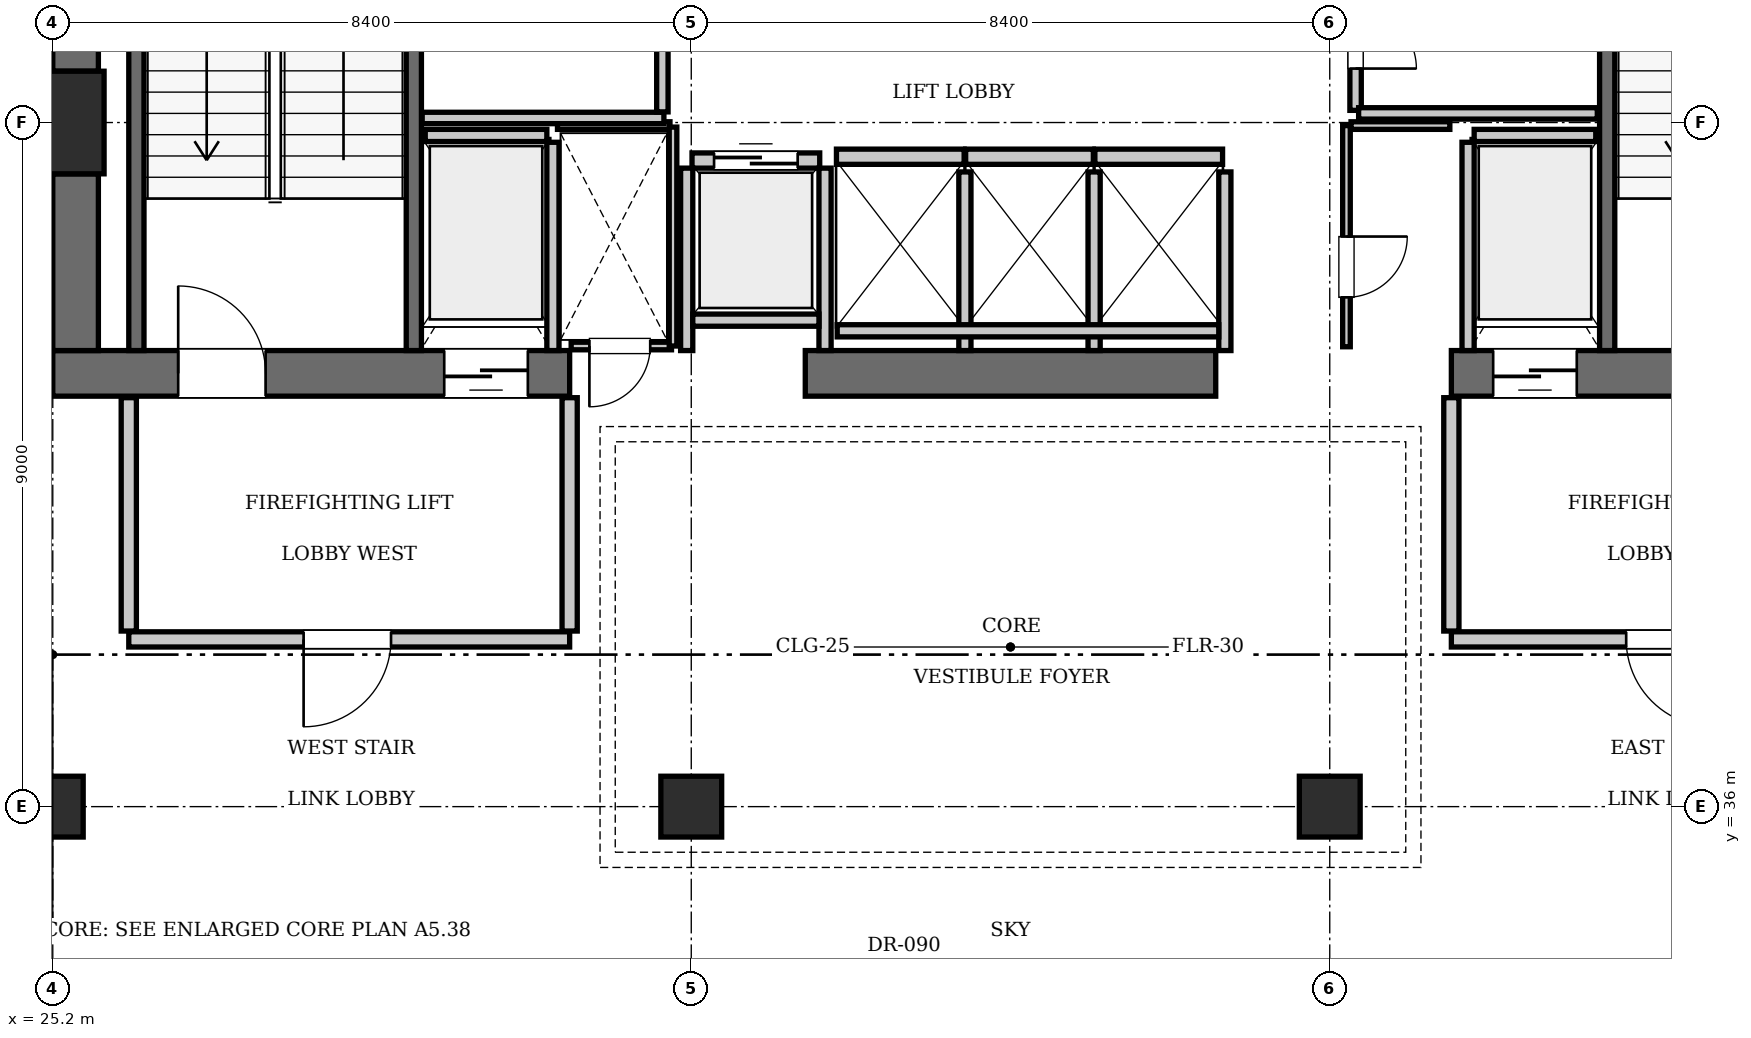
"""IFC4 building model, lengths in metres.
Left out: names, types, materials, properties, quantities, classifications, styles, units other than length and angle.
Written with IfcOpenShell. Run it as: python <this file> out.ifc"""

import sys

from ifc_helpers import new_model, si_unit, direction, frame, frame_2d, origin, origin_2d, place, context, subcontext, project, spatial, rectangle, extrude, element, fill, save


model = new_model("IFC4")
c1 = context("Model", 3, precision=1e-05, world=origin(), true_north=direction((0.0, 1.0)))
c2 = subcontext(c1, "Body", "Model", "MODEL_VIEW")
j1 = project(units=[si_unit("LENGTHUNIT", "METRE"), si_unit("PLANEANGLEUNIT", "RADIAN")], contexts=[c1])
p1 = place(None, origin())
s1 = spatial("IfcSite", under=j1, at=p1, CompositionType="ELEMENT")
p2 = place(p1, origin())
s2 = spatial("IfcBuilding", under=s1, at=p2, CompositionType="ELEMENT")
p3 = place(p2, frame((0.0, 0.0, 345.1)))
s3 = spatial("IfcBuildingStorey", under=s2, at=p3, CompositionType="ELEMENT", Elevation=345.1)
p4 = place(p3, frame((25.2, 45.0, 0.0), z_axis=(0.0, 0.0, 1.0), x_axis=(1.0, 0.0, 0.0)))
e1 = element("IfcColumn", 1, at=p4, inside=s3, PredefinedType="COLUMN", context=c2, shape_type="SweptSolid", body=[
    extrude(rectangle(XDim=1.35, YDim=1.35, at=origin_2d()), origin(), (0.0, 0.0, 1.0), 4.55),
])
p5 = place(p3, frame((25.2, 41.7, 0.0), z_axis=(0.0, 0.0, 1.0), x_axis=(1.0, 0.0, 0.0)))
e2 = element("IfcWall", 2, at=p5, inside=s3, PredefinedType="SHEAR", context=c2, shape_type="SweptSolid", body=[
    extrude(rectangle(XDim=6.8, YDim=0.6, at=frame_2d((3.4, 0.0))), origin(), (0.0, 0.0, 1.0), 4.55),
])
p6 = place(p5, frame((1.65, 0.0, 0.0)))
e3 = element("IfcOpeningElement", 3, at=p6, cuts=e2, PredefinedType="OPENING", context=c2, shape_type="SweptSolid", body=[
    extrude(rectangle(XDim=1.15, YDim=2.15, at=frame_2d((0.575, 1.075))), frame((0.0, 0.31, 0.0), z_axis=(0.0, -1.0, 0.0), x_axis=(1.0, 0.0, 0.0)), (0.0, 0.0, 1.0), 0.62),
])
p7 = place(p5, frame((5.15, 0.0, 0.0)))
e4 = element("IfcOpeningElement", 4, at=p7, cuts=e2, PredefinedType="OPENING", context=c2, shape_type="SweptSolid", body=[
    extrude(rectangle(XDim=1.1, YDim=2.2, at=frame_2d((0.55, 1.1))), frame((0.0, 0.31, 0.0), z_axis=(0.0, -1.0, 0.0), x_axis=(1.0, 0.0, 0.0)), (0.0, 0.0, 1.0), 0.62),
])
p8 = place(p3, frame((35.1, 41.7, 0.0), z_axis=(0.0, 0.0, 1.0), x_axis=(1.0, 0.0, 0.0)))
e5 = element("IfcWall", 5, at=p8, inside=s3, PredefinedType="SHEAR", context=c2, shape_type="SweptSolid", body=[
    extrude(rectangle(XDim=5.4, YDim=0.6, at=frame_2d((2.7, 0.0))), origin(), (0.0, 0.0, 1.0), 4.55),
])
p9 = place(p3, frame((43.6, 41.7, 0.0), z_axis=(0.0, 0.0, 1.0), x_axis=(1.0, 0.0, 0.0)))
e6 = element("IfcWall", 6, at=p9, inside=s3, PredefinedType="SHEAR", context=c2, shape_type="SweptSolid", body=[
    extrude(rectangle(XDim=6.8, YDim=0.6, at=frame_2d((3.4, 0.0))), origin(), (0.0, 0.0, 1.0), 4.55),
])
p10 = place(p9, frame((3.9, 0.0, 0.0)))
e7 = element("IfcOpeningElement", 7, at=p10, cuts=e6, PredefinedType="OPENING", context=c2, shape_type="SweptSolid", body=[
    extrude(rectangle(XDim=1.15, YDim=2.15, at=frame_2d((0.575, 1.075))), frame((0.0, 0.31, 0.0), z_axis=(0.0, -1.0, 0.0), x_axis=(1.0, 0.0, 0.0)), (0.0, 0.0, 1.0), 0.62),
])
p11 = place(p9, frame((0.55, 0.0, 0.0)))
e8 = element("IfcOpeningElement", 8, at=p11, cuts=e6, PredefinedType="OPENING", context=c2, shape_type="SweptSolid", body=[
    extrude(rectangle(XDim=1.1, YDim=2.2, at=frame_2d((0.55, 1.1))), frame((0.0, 0.31, 0.0), z_axis=(0.0, -1.0, 0.0), x_axis=(1.0, 0.0, 0.0)), (0.0, 0.0, 1.0), 0.62),
])
p12 = place(p3, frame((25.5, 42.0, 0.0), z_axis=(0.0, 0.0, 1.0), x_axis=(0.0, 1.0, 0.0)))
e9 = element("IfcWall", 9, at=p12, inside=s3, PredefinedType="SHEAR", context=c2, shape_type="SweptSolid", body=[
    extrude(rectangle(XDim=2.325, YDim=0.6, at=frame_2d((1.163, 0.0))), origin(), (0.0, 0.0, 1.0), 4.55),
])
p13 = place(p3, frame((25.5, 45.675, 0.0), z_axis=(0.0, 0.0, 1.0), x_axis=(0.0, 1.0, 0.0)))
e10 = element("IfcWall", 10, at=p13, inside=s3, PredefinedType="SHEAR", context=c2, shape_type="SweptSolid", body=[
    extrude(rectangle(XDim=7.725, YDim=0.6, at=frame_2d((3.862, 0.0))), origin(), (0.0, 0.0, 1.0), 4.55),
])
for number, where, z_axis, x_axis in (
    (11, (25.2, 36.0, 0.0), (0.0, 0.0, 1.0), (1.0, 0.0, 0.0)),
    (12, (33.6, 36.0, 0.0), (0.0, 0.0, 1.0), (1.0, 0.0, 0.0)),
    (13, (42.0, 36.0, 0.0), (0.0, 0.0, 1.0), (1.0, 0.0, 0.0)),
):
    element("IfcColumn", number, at=place(p3, frame(where, z_axis=z_axis, x_axis=x_axis)), inside=s3, PredefinedType="COLUMN", context=c2, shape_type="SweptSolid", body=[
        extrude(rectangle(XDim=0.8, YDim=0.8, at=origin_2d()), origin(), (0.0, 0.0, 1.0), 4.55),
    ])
p14 = place(p3, frame((29.95, 42.0, 0.0), z_axis=(0.0, 0.0, 1.0), x_axis=(0.0, 1.0, 0.0)))
e14 = element("IfcWall", 14, at=p14, inside=s3, PredefinedType="SOLIDWALL", context=c2, shape_type="SweptSolid", body=[
    extrude(rectangle(XDim=9.15, YDim=0.2, at=frame_2d((4.575, 0.0))), origin(), (0.0, 0.0, 1.0), 4.31),
])
p15 = place(p3, frame((26.3, 42.0, 0.0), z_axis=(0.0, 0.0, 1.0), x_axis=(0.0, 1.0, 0.0)))
e15 = element("IfcWall", 15, at=p15, inside=s3, PredefinedType="SOLIDWALL", context=c2, shape_type="SweptSolid", body=[
    extrude(rectangle(XDim=9.12, YDim=0.2, at=frame_2d((4.56, 0.0))), origin(), (0.0, 0.0, 1.0), 4.31),
])
p16 = place(p3, frame((45.65, 42.0, 0.0), z_axis=(0.0, 0.0, 1.0), x_axis=(0.0, 1.0, 0.0)))
e16 = element("IfcWall", 16, at=p16, inside=s3, PredefinedType="SOLIDWALL", context=c2, shape_type="SweptSolid", body=[
    extrude(rectangle(XDim=9.15, YDim=0.2, at=frame_2d((4.575, 0.0))), origin(), (0.0, 0.0, 1.0), 4.31),
])
for number, where, z_axis, x_axis in (
    (17, (35.51, 44.55, 0.0), (0.0, 0.0, 1.0), (1.0, 0.0, 0.0)),
    (18, (37.21, 44.55, 0.0), (0.0, 0.0, 1.0), (1.0, 0.0, 0.0)),
):
    element("IfcWall", number, at=place(p3, frame(where, z_axis=z_axis, x_axis=x_axis)), inside=s3, PredefinedType="SOLIDWALL", context=c2, shape_type="SweptSolid", body=[
        extrude(rectangle(XDim=1.68, YDim=0.2, at=frame_2d((0.84, 0.0))), origin(), (0.0, 0.0, 1.0), 4.31),
    ])
p17 = place(p3, frame((38.91, 44.55, 0.0), z_axis=(0.0, 0.0, 1.0), x_axis=(1.0, 0.0, 0.0)))
e19 = element("IfcWall", 19, at=p17, inside=s3, PredefinedType="SOLIDWALL", context=c2, shape_type="SweptSolid", body=[
    extrude(rectangle(XDim=1.68, YDim=0.2, at=frame_2d((0.84, 0.0))), origin(), (0.0, 0.0, 1.0), 4.31),
])
p18 = place(p3, frame((33.61, 44.5, 0.0), z_axis=(0.0, 0.0, 1.0), x_axis=(1.0, 0.0, 0.0)))
e20 = element("IfcWall", 20, at=p18, inside=s3, PredefinedType="SOLIDWALL", context=c2, shape_type="SweptSolid", body=[
    extrude(rectangle(XDim=1.68, YDim=0.2, at=frame_2d((0.84, 0.0))), origin(), (0.0, 0.0, 1.0), 4.31),
])
p19 = place(p18, frame((0.29, 0.0, 0.0)))
e21 = element("IfcOpeningElement", 21, at=p19, cuts=e20, PredefinedType="OPENING", context=c2, shape_type="SweptSolid", body=[
    extrude(rectangle(XDim=1.1, YDim=2.2, at=frame_2d((0.55, 1.1))), frame((0.0, 0.11, 0.0), z_axis=(0.0, -1.0, 0.0), x_axis=(1.0, 0.0, 0.0)), (0.0, 0.0, 1.0), 0.22),
])
p20 = place(p3, frame((30.1, 44.83, 0.0), z_axis=(0.0, 0.0, 1.0), x_axis=(1.0, 0.0, 0.0)))
e22 = element("IfcWall", 22, at=p20, inside=s3, PredefinedType="SOLIDWALL", context=c2, shape_type="SweptSolid", body=[
    extrude(rectangle(XDim=1.6, YDim=0.16, at=frame_2d((0.8, 0.0))), origin(), (0.0, 0.0, 1.0), 4.31),
])
p21 = place(p3, frame((31.78, 42.0, 0.0), z_axis=(0.0, 0.0, 1.0), x_axis=(0.0, 1.0, 0.0)))
e23 = element("IfcWall", 23, at=p21, inside=s3, PredefinedType="SOLIDWALL", context=c2, shape_type="SweptSolid", body=[
    extrude(rectangle(XDim=2.74, YDim=0.16, at=frame_2d((1.37, 0.0))), origin(), (0.0, 0.0, 1.0), 4.31),
])
p22 = place(p3, frame((43.9, 44.83, 0.0), z_axis=(0.0, 0.0, 1.0), x_axis=(1.0, 0.0, 0.0)))
e24 = element("IfcWall", 24, at=p22, inside=s3, PredefinedType="SOLIDWALL", context=c2, shape_type="SweptSolid", body=[
    extrude(rectangle(XDim=1.6, YDim=0.16, at=frame_2d((0.8, 0.0))), origin(), (0.0, 0.0, 1.0), 4.31),
])
p23 = place(p3, frame((43.82, 42.0, 0.0), z_axis=(0.0, 0.0, 1.0), x_axis=(0.0, 1.0, 0.0)))
e25 = element("IfcWall", 25, at=p23, inside=s3, PredefinedType="SOLIDWALL", context=c2, shape_type="SweptSolid", body=[
    extrude(rectangle(XDim=2.74, YDim=0.16, at=frame_2d((1.37, 0.0))), origin(), (0.0, 0.0, 1.0), 4.31),
])
for number, where, z_axis, x_axis in (
    (26, (37.2, 42.0, 0.0), (0.0, 0.0, 1.0), (0.0, 1.0, 0.0)),
    (27, (38.9, 42.0, 0.0), (0.0, 0.0, 1.0), (0.0, 1.0, 0.0)),
    (28, (40.62, 42.0, 0.0), (0.0, 0.0, 1.0), (0.0, 1.0, 0.0)),
):
    element("IfcWall", number, at=place(p3, frame(where, z_axis=z_axis, x_axis=x_axis)), inside=s3, PredefinedType="SOLIDWALL", context=c2, shape_type="SweptSolid", body=[
        extrude(rectangle(XDim=2.35, YDim=0.16, at=frame_2d((1.175, 0.0))), origin(), (0.0, 0.0, 1.0), 4.31),
    ])
p24 = place(p3, frame((35.52, 42.26, 0.0), z_axis=(0.0, 0.0, 1.0), x_axis=(1.0, 0.0, 0.0)))
e29 = element("IfcWall", 29, at=p24, inside=s3, PredefinedType="SOLIDWALL", context=c2, shape_type="SweptSolid", body=[
    extrude(rectangle(XDim=5.02, YDim=0.16, at=frame_2d((2.51, 0.0))), origin(), (0.0, 0.0, 1.0), 4.31),
])
for number, where, z_axis, x_axis in (
    (30, (33.54, 42.0, 0.0), (0.0, 0.0, 1.0), (0.0, 1.0, 0.0)),
    (31, (35.36, 42.0, 0.0), (0.0, 0.0, 1.0), (0.0, 1.0, 0.0)),
):
    element("IfcWall", number, at=place(p3, frame(where, z_axis=z_axis, x_axis=x_axis)), inside=s3, PredefinedType="SOLIDWALL", context=c2, shape_type="SweptSolid", body=[
        extrude(rectangle(XDim=2.4, YDim=0.16, at=frame_2d((1.2, 0.0))), origin(), (0.0, 0.0, 1.0), 4.31),
    ])
p25 = place(p3, frame((33.62, 42.4, 0.0), z_axis=(0.0, 0.0, 1.0), x_axis=(1.0, 0.0, 0.0)))
e32 = element("IfcWall", 32, at=p25, inside=s3, PredefinedType="SOLIDWALL", context=c2, shape_type="SweptSolid", body=[
    extrude(rectangle(XDim=1.66, YDim=0.16, at=frame_2d((0.83, 0.0))), origin(), (0.0, 0.0, 1.0), 4.31),
])
p26 = place(p3, frame((26.2, 38.2, 0.0), z_axis=(0.0, 0.0, 1.0), x_axis=(1.0, 0.0, 0.0)))
e33 = element("IfcWall", 33, at=p26, inside=s3, PredefinedType="PARTITIONING", context=c2, shape_type="SweptSolid", body=[
    extrude(rectangle(XDim=5.8, YDim=0.2, at=frame_2d((2.9, 0.0))), origin(), (0.0, 0.0, 1.0), 4.31),
])
p27 = place(p26, frame((2.3, 0.0, 0.0)))
e34 = element("IfcOpeningElement", 34, at=p27, cuts=e33, PredefinedType="OPENING", context=c2, shape_type="SweptSolid", body=[
    extrude(rectangle(XDim=1.15, YDim=2.15, at=frame_2d((0.575, 1.075))), frame((0.0, 0.11, 0.0), z_axis=(0.0, -1.0, 0.0), x_axis=(1.0, 0.0, 0.0)), (0.0, 0.0, 1.0), 0.22),
])
for number, where, z_axis, x_axis in (
    (35, (26.2, 38.31, 0.0), (0.0, 0.0, 1.0), (0.0, 1.0, 0.0)),
    (36, (32.0, 38.31, 0.0), (0.0, 0.0, 1.0), (0.0, 1.0, 0.0)),
):
    element("IfcWall", number, at=place(p3, frame(where, z_axis=z_axis, x_axis=x_axis)), inside=s3, PredefinedType="PARTITIONING", context=c2, shape_type="SweptSolid", body=[
        extrude(rectangle(XDim=3.07, YDim=0.2, at=frame_2d((1.535, 0.0))), origin(), (0.0, 0.0, 1.0), 4.31),
    ])
p28 = place(p3, frame((43.6, 38.2, 0.0), z_axis=(0.0, 0.0, 1.0), x_axis=(1.0, 0.0, 0.0)))
e37 = element("IfcWall", 37, at=p28, inside=s3, PredefinedType="PARTITIONING", context=c2, shape_type="SweptSolid", body=[
    extrude(rectangle(XDim=5.8, YDim=0.2, at=frame_2d((2.9, 0.0))), origin(), (0.0, 0.0, 1.0), 4.31),
])
p29 = place(p28, frame((2.3, 0.0, 0.0)))
e38 = element("IfcOpeningElement", 38, at=p29, cuts=e37, PredefinedType="OPENING", context=c2, shape_type="SweptSolid", body=[
    extrude(rectangle(XDim=1.15, YDim=2.15, at=frame_2d((0.575, 1.075))), frame((0.0, 0.11, 0.0), z_axis=(0.0, -1.0, 0.0), x_axis=(1.0, 0.0, 0.0)), (0.0, 0.0, 1.0), 0.22),
])
p30 = place(p3, frame((43.6, 38.31, 0.0), z_axis=(0.0, 0.0, 1.0), x_axis=(0.0, 1.0, 0.0)))
e39 = element("IfcWall", 39, at=p30, inside=s3, PredefinedType="PARTITIONING", context=c2, shape_type="SweptSolid", body=[
    extrude(rectangle(XDim=3.07, YDim=0.2, at=frame_2d((1.535, 0.0))), origin(), (0.0, 0.0, 1.0), 4.31),
])
p31 = place(p3, frame((32.02, 42.06, 0.0), z_axis=(0.0, 0.0, 1.0), x_axis=(1.0, 0.0, 0.0)))
e40 = element("IfcWall", 40, at=p31, inside=s3, PredefinedType="PARTITIONING", context=c2, shape_type="SweptSolid", body=[
    extrude(rectangle(XDim=1.32, YDim=0.1, at=frame_2d((0.66, 0.0))), origin(), (0.0, 0.0, 1.0), 4.31),
])
p32 = place(p31, frame((0.24, 0.0, 0.0)))
e41 = element("IfcOpeningElement", 41, at=p32, cuts=e40, PredefinedType="OPENING", context=c2, shape_type="SweptSolid", body=[
    extrude(rectangle(XDim=0.8, YDim=2.05, at=frame_2d((0.4, 1.025))), frame((0.0, 0.06, 0.0), z_axis=(0.0, -1.0, 0.0), x_axis=(1.0, 0.0, 0.0)), (0.0, 0.0, 1.0), 0.12),
])
p33 = place(p3, frame((31.84, 44.96, 0.0), z_axis=(0.0, 0.0, 1.0), x_axis=(1.0, 0.0, 0.0)))
e42 = element("IfcWall", 42, at=p33, inside=s3, PredefinedType="PARTITIONING", context=c2, shape_type="SweptSolid", body=[
    extrude(rectangle(XDim=1.48, YDim=0.1, at=frame_2d((0.74, 0.0))), origin(), (0.0, 0.0, 1.0), 4.31),
])
p34 = place(p3, frame((33.36, 42.06, 0.0), z_axis=(0.0, 0.0, 1.0), x_axis=(0.0, 1.0, 0.0)))
e43 = element("IfcWall", 43, at=p34, inside=s3, PredefinedType="PARTITIONING", context=c2, shape_type="SweptSolid", body=[
    extrude(rectangle(XDim=2.88, YDim=0.1, at=frame_2d((1.44, 0.0))), origin(), (0.0, 0.0, 1.0), 4.31),
])
p35 = place(p3, frame((42.22, 42.05, 0.0), z_axis=(0.0, 0.0, 1.0), x_axis=(0.0, 1.0, 0.0)))
e44 = element("IfcWall", 44, at=p35, inside=s3, PredefinedType="PARTITIONING", context=c2, shape_type="SweptSolid", body=[
    extrude(rectangle(XDim=2.91, YDim=0.1, at=frame_2d((1.455, 0.0))), origin(), (0.0, 0.0, 1.0), 4.31),
])
p36 = place(p35, frame((0.65, 0.0, 0.0)))
e45 = element("IfcOpeningElement", 45, at=p36, cuts=e44, PredefinedType="OPENING", context=c2, shape_type="SweptSolid", body=[
    extrude(rectangle(XDim=0.8, YDim=2.05, at=frame_2d((0.4, 1.025))), frame((0.0, 0.06, 0.0), z_axis=(0.0, -1.0, 0.0), x_axis=(1.0, 0.0, 0.0)), (0.0, 0.0, 1.0), 0.12),
])
p37 = place(p3, frame((42.28, 44.96, 0.0), z_axis=(0.0, 0.0, 1.0), x_axis=(1.0, 0.0, 0.0)))
e46 = element("IfcWall", 46, at=p37, inside=s3, PredefinedType="PARTITIONING", context=c2, shape_type="SweptSolid", body=[
    extrude(rectangle(XDim=1.3, YDim=0.1, at=frame_2d((0.65, 0.0))), origin(), (0.0, 0.0, 1.0), 4.31),
])
p38 = place(p3, frame((30.06, 45.06, 0.0), z_axis=(0.0, 0.0, 1.0), x_axis=(1.0, 0.0, 0.0)))
e47 = element("IfcWall", 47, at=p38, inside=s3, PredefinedType="PARTITIONING", context=c2, shape_type="SweptSolid", body=[
    extrude(rectangle(XDim=3.18, YDim=0.15, at=frame_2d((1.59, 0.0))), origin(), (0.0, 0.0, 1.0), 4.31),
])
p39 = place(p3, frame((33.22, 45.14, 0.0), z_axis=(0.0, 0.0, 1.0), x_axis=(0.0, 1.0, 0.0)))
e48 = element("IfcWall", 48, at=p39, inside=s3, PredefinedType="PARTITIONING", context=c2, shape_type="SweptSolid", body=[
    extrude(rectangle(XDim=4.16, YDim=0.15, at=frame_2d((2.08, 0.0))), origin(), (0.0, 0.0, 1.0), 4.31),
])
p40 = place(p3, frame((42.34, 45.16, 0.0), z_axis=(0.0, 0.0, 1.0), x_axis=(0.0, 1.0, 0.0)))
e49 = element("IfcWall", 49, at=p40, inside=s3, PredefinedType="PARTITIONING", context=c2, shape_type="SweptSolid", body=[
    extrude(rectangle(XDim=1.68, YDim=0.15, at=frame_2d((0.84, 0.0))), origin(), (0.0, 0.0, 1.0), 4.31),
])
p41 = place(p40, frame((0.55, 0.0, 0.0)))
e50 = element("IfcOpeningElement", 50, at=p41, cuts=e49, PredefinedType="OPENING", context=c2, shape_type="SweptSolid", body=[
    extrude(rectangle(XDim=0.8, YDim=2.05, at=frame_2d((0.4, 1.025))), frame((0.0, 0.085, 0.0), z_axis=(0.0, -1.0, 0.0), x_axis=(1.0, 0.0, 0.0)), (0.0, 0.0, 1.0), 0.17),
])
p42 = place(p3, frame((42.38, 45.12, 0.0), z_axis=(0.0, 0.0, 1.0), x_axis=(1.0, 0.0, 0.0)))
e51 = element("IfcWall", 51, at=p42, inside=s3, PredefinedType="PARTITIONING", context=c2, shape_type="SweptSolid", body=[
    extrude(rectangle(XDim=3.14, YDim=0.15, at=frame_2d((1.57, 0.0))), origin(), (0.0, 0.0, 1.0), 4.31),
])
p43 = place(p6, origin())
e52 = element("IfcDoor", 52, at=p43, inside=s3, OperationType="SINGLE_SWING_LEFT", PredefinedType="DOOR", context=c2, shape_type="SweptSolid", body=[
    extrude(rectangle(XDim=1.15, YDim=2.15, at=frame_2d((0.575, 1.075))), frame((0.0, 0.025, 0.0), z_axis=(0.0, -1.0, 0.0), x_axis=(1.0, 0.0, 0.0)), (0.0, 0.0, 1.0), 0.05),
])
fill(e3, e52)
p44 = place(p19, origin())
e53 = element("IfcDoor", 53, at=p44, inside=s3, OperationType="SLIDING_TO_RIGHT", PredefinedType="DOOR", context=c2, shape_type="SweptSolid", body=[
    extrude(rectangle(XDim=1.1, YDim=2.2, at=frame_2d((0.55, 1.1))), frame((0.0, 0.025, 0.0), z_axis=(0.0, -1.0, 0.0), x_axis=(1.0, 0.0, 0.0)), (0.0, 0.0, 1.0), 0.05),
])
fill(e21, e53)
p45 = place(p7, frame((1.1, 0.0, 0.0), z_axis=(0.0, 0.0, 1.0), x_axis=(-1.0, 0.0, 0.0)))
e54 = element("IfcDoor", 54, at=p45, inside=s3, OperationType="SLIDING_TO_LEFT", PredefinedType="DOOR", context=c2, shape_type="SweptSolid", body=[
    extrude(rectangle(XDim=1.1, YDim=2.2, at=frame_2d((0.55, 1.1))), frame((0.0, 0.025, 0.0), z_axis=(0.0, -1.0, 0.0), x_axis=(1.0, 0.0, 0.0)), (0.0, 0.0, 1.0), 0.05),
])
fill(e4, e54)
p46 = place(p11, frame((1.1, 0.0, 0.0), z_axis=(0.0, 0.0, 1.0), x_axis=(-1.0, 0.0, 0.0)))
e55 = element("IfcDoor", 55, at=p46, inside=s3, OperationType="SLIDING_TO_LEFT", PredefinedType="DOOR", context=c2, shape_type="SweptSolid", body=[
    extrude(rectangle(XDim=1.1, YDim=2.2, at=frame_2d((0.55, 1.1))), frame((0.0, 0.025, 0.0), z_axis=(0.0, -1.0, 0.0), x_axis=(1.0, 0.0, 0.0)), (0.0, 0.0, 1.0), 0.05),
])
fill(e8, e55)
p47 = place(p27, frame((1.15, 0.0, 0.0), z_axis=(0.0, 0.0, 1.0), x_axis=(-1.0, 0.0, 0.0)))
e56 = element("IfcDoor", 56, at=p47, inside=s3, OperationType="SINGLE_SWING_RIGHT", PredefinedType="DOOR", context=c2, shape_type="SweptSolid", body=[
    extrude(rectangle(XDim=1.15, YDim=2.15, at=frame_2d((0.575, 1.075))), frame((0.0, 0.025, 0.0), z_axis=(0.0, -1.0, 0.0), x_axis=(1.0, 0.0, 0.0)), (0.0, 0.0, 1.0), 0.05),
])
fill(e34, e56)
p48 = place(p29, frame((1.15, 0.0, 0.0), z_axis=(0.0, 0.0, 1.0), x_axis=(-1.0, 0.0, 0.0)))
e57 = element("IfcDoor", 57, at=p48, inside=s3, OperationType="SINGLE_SWING_LEFT", PredefinedType="DOOR", context=c2, shape_type="SweptSolid", body=[
    extrude(rectangle(XDim=1.15, YDim=2.15, at=frame_2d((0.575, 1.075))), frame((0.0, 0.025, 0.0), z_axis=(0.0, -1.0, 0.0), x_axis=(1.0, 0.0, 0.0)), (0.0, 0.0, 1.0), 0.05),
])
fill(e38, e57)
p49 = place(p32, frame((0.8, 0.0, 0.0), z_axis=(0.0, 0.0, 1.0), x_axis=(-1.0, 0.0, 0.0)))
e58 = element("IfcDoor", 58, at=p49, inside=s3, OperationType="SINGLE_SWING_RIGHT", PredefinedType="DOOR", context=c2, shape_type="SweptSolid", body=[
    extrude(rectangle(XDim=0.8, YDim=2.05, at=frame_2d((0.4, 1.025))), frame((0.0, 0.025, 0.0), z_axis=(0.0, -1.0, 0.0), x_axis=(1.0, 0.0, 0.0)), (0.0, 0.0, 1.0), 0.05),
])
fill(e41, e58)
p50 = place(p36, frame((0.8, 0.0, 0.0), z_axis=(0.0, 0.0, 1.0), x_axis=(-1.0, 0.0, 0.0)))
e59 = element("IfcDoor", 59, at=p50, inside=s3, OperationType="SINGLE_SWING_LEFT", PredefinedType="DOOR", context=c2, shape_type="SweptSolid", body=[
    extrude(rectangle(XDim=0.8, YDim=2.05, at=frame_2d((0.4, 1.025))), frame((0.0, 0.025, 0.0), z_axis=(0.0, -1.0, 0.0), x_axis=(1.0, 0.0, 0.0)), (0.0, 0.0, 1.0), 0.05),
])
fill(e45, e59)
p51 = place(p41, frame((0.8, 0.0, 0.0), z_axis=(0.0, 0.0, 1.0), x_axis=(-1.0, 0.0, 0.0)))
e60 = element("IfcDoor", 60, at=p51, inside=s3, OperationType="SINGLE_SWING_RIGHT", PredefinedType="DOOR", context=c2, shape_type="SweptSolid", body=[
    extrude(rectangle(XDim=0.8, YDim=2.05, at=frame_2d((0.4, 1.025))), frame((0.0, 0.025, 0.0), z_axis=(0.0, -1.0, 0.0), x_axis=(1.0, 0.0, 0.0)), (0.0, 0.0, 1.0), 0.05),
])
fill(e50, e60)
save(model, sys.argv[1])
